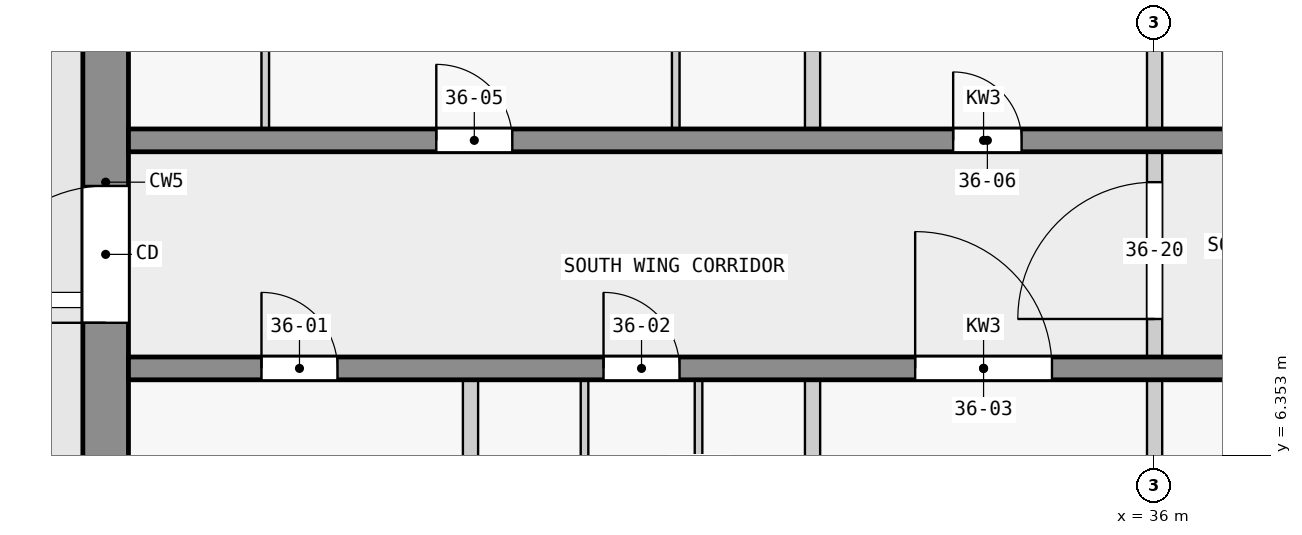
"""IFC4 building model, lengths in metres.
Left out: names, types, materials, properties, quantities, classifications, styles, units other than length and angle.
Written with IfcOpenShell. Run it as: python <this file> out.ifc"""

import sys

from ifc_helpers import new_model, si_unit, direction, frame, frame_2d, origin, place, context, subcontext, project, spatial, rectangle, extrude, element, fill, save


model = new_model("IFC4")
c1 = context("Model", 3, precision=1e-05, world=origin(), true_north=direction((0.0, 1.0)))
c2 = subcontext(c1, "Body", "Model", "MODEL_VIEW")
j1 = project(units=[si_unit("LENGTHUNIT", "METRE"), si_unit("PLANEANGLEUNIT", "RADIAN")], contexts=[c1])
p1 = place(None, origin())
s1 = spatial("IfcSite", under=j1, at=p1, CompositionType="ELEMENT")
p2 = place(p1, origin())
s2 = spatial("IfcBuilding", under=s1, at=p2, CompositionType="ELEMENT")
p3 = place(p2, frame((0.0, 0.0, 142.9)))
s3 = spatial("IfcBuildingStorey", under=s2, at=p3, CompositionType="ELEMENT", Elevation=142.9)
p4 = place(p3, frame((22.2, 2.5, 0.0), z_axis=(0.0, 0.0, 1.0), x_axis=(0.0, 1.0, 0.0)))
e1 = element("IfcWall", 1, at=p4, inside=s3, PredefinedType="SHEAR", context=c2, shape_type="SweptSolid", body=[
    extrude(rectangle(XDim=14.9, YDim=0.6, at=frame_2d((7.45, 0.0))), origin(), (0.0, 0.0, 1.0), 3.25),
])
p5 = place(p4, frame((5.6, 0.0, 0.0)))
e2 = element("IfcOpeningElement", 2, at=p5, cuts=e1, PredefinedType="OPENING", context=c2, shape_type="SweptSolid", body=[
    extrude(rectangle(XDim=1.8, YDim=2.1, at=frame_2d((0.9, 1.05))), frame((0.0, 0.31, 0.0), z_axis=(0.0, -1.0, 0.0), x_axis=(1.0, 0.0, 0.0)), (0.0, 0.0, 1.0), 0.62),
])
p6 = place(p3, frame((22.5, 7.5, 0.0), z_axis=(0.0, 0.0, 1.0), x_axis=(1.0, 0.0, 0.0)))
e3 = element("IfcWall", 3, at=p6, inside=s3, PredefinedType="SHEAR", context=c2, shape_type="SweptSolid", body=[
    extrude(rectangle(XDim=22.5, YDim=0.3, at=frame_2d((11.25, 0.0))), origin(), (0.0, 0.0, 1.0), 3.25),
])
p7 = place(p6, frame((1.75, 0.0, 0.0)))
e4 = element("IfcOpeningElement", 4, at=p7, cuts=e3, PredefinedType="OPENING", context=c2, shape_type="SweptSolid", body=[
    extrude(rectangle(XDim=1.0, YDim=2.1, at=frame_2d((0.5, 1.05))), frame((0.0, 0.16, 0.0), z_axis=(0.0, -1.0, 0.0), x_axis=(1.0, 0.0, 0.0)), (0.0, 0.0, 1.0), 0.32),
])
p8 = place(p6, frame((6.25, 0.0, 0.0)))
e5 = element("IfcOpeningElement", 5, at=p8, cuts=e3, PredefinedType="OPENING", context=c2, shape_type="SweptSolid", body=[
    extrude(rectangle(XDim=1.0, YDim=2.1, at=frame_2d((0.5, 1.05))), frame((0.0, 0.16, 0.0), z_axis=(0.0, -1.0, 0.0), x_axis=(1.0, 0.0, 0.0)), (0.0, 0.0, 1.0), 0.32),
])
p9 = place(p6, frame((10.35, 0.0, 0.0)))
e6 = element("IfcOpeningElement", 6, at=p9, cuts=e3, PredefinedType="OPENING", context=c2, shape_type="SweptSolid", body=[
    extrude(rectangle(XDim=1.8, YDim=2.1, at=frame_2d((0.9, 1.05))), frame((0.0, 0.16, 0.0), z_axis=(0.0, -1.0, 0.0), x_axis=(1.0, 0.0, 0.0)), (0.0, 0.0, 1.0), 0.32),
])
p10 = place(p6, frame((16.85, 0.0, 0.0)))
e7 = element("IfcOpeningElement", 7, at=p10, cuts=e3, PredefinedType="OPENING", context=c2, shape_type="SweptSolid", body=[
    extrude(rectangle(XDim=1.0, YDim=2.1, at=frame_2d((0.5, 1.05))), frame((0.0, 0.16, 0.0), z_axis=(0.0, -1.0, 0.0), x_axis=(1.0, 0.0, 0.0)), (0.0, 0.0, 1.0), 0.32),
])
p11 = place(p3, frame((22.5, 10.5, 0.0), z_axis=(0.0, 0.0, 1.0), x_axis=(1.0, 0.0, 0.0)))
e8 = element("IfcWall", 8, at=p11, inside=s3, PredefinedType="SHEAR", context=c2, shape_type="SweptSolid", body=[
    extrude(rectangle(XDim=22.5, YDim=0.3, at=frame_2d((11.25, 0.0))), origin(), (0.0, 0.0, 1.0), 3.25),
])
p12 = place(p11, frame((4.05, 0.0, 0.0)))
e9 = element("IfcOpeningElement", 9, at=p12, cuts=e8, PredefinedType="OPENING", context=c2, shape_type="SweptSolid", body=[
    extrude(rectangle(XDim=1.0, YDim=2.1, at=frame_2d((0.5, 1.05))), frame((0.0, 0.16, 0.0), z_axis=(0.0, -1.0, 0.0), x_axis=(1.0, 0.0, 0.0)), (0.0, 0.0, 1.0), 0.32),
])
p13 = place(p11, frame((10.85, 0.0, 0.0)))
e10 = element("IfcOpeningElement", 10, at=p13, cuts=e8, PredefinedType="OPENING", context=c2, shape_type="SweptSolid", body=[
    extrude(rectangle(XDim=0.9, YDim=2.1, at=frame_2d((0.45, 1.05))), frame((0.0, 0.16, 0.0), z_axis=(0.0, -1.0, 0.0), x_axis=(1.0, 0.0, 0.0)), (0.0, 0.0, 1.0), 0.32),
])
p14 = place(p11, frame((15.25, 0.0, 0.0)))
e11 = element("IfcOpeningElement", 11, at=p14, cuts=e8, PredefinedType="OPENING", context=c2, shape_type="SweptSolid", body=[
    extrude(rectangle(XDim=1.0, YDim=2.1, at=frame_2d((0.5, 1.05))), frame((0.0, 0.16, 0.0), z_axis=(0.0, -1.0, 0.0), x_axis=(1.0, 0.0, 0.0)), (0.0, 0.0, 1.0), 0.32),
])
p15 = place(p11, frame((18.75, 0.0, 0.0)))
e12 = element("IfcOpeningElement", 12, at=p15, cuts=e8, PredefinedType="OPENING", context=c2, shape_type="SweptSolid", body=[
    extrude(rectangle(XDim=0.9, YDim=2.1, at=frame_2d((0.45, 1.05))), frame((0.0, 0.16, 0.0), z_axis=(0.0, -1.0, 0.0), x_axis=(1.0, 0.0, 0.0)), (0.0, 0.0, 1.0), 0.32),
])
p16 = place(p11, frame((20.95, 0.0, 0.0)))
e13 = element("IfcOpeningElement", 13, at=p16, cuts=e8, PredefinedType="OPENING", context=c2, shape_type="SweptSolid", body=[
    extrude(rectangle(XDim=1.0, YDim=2.1, at=frame_2d((0.5, 1.05))), frame((0.0, 0.16, 0.0), z_axis=(0.0, -1.0, 0.0), x_axis=(1.0, 0.0, 0.0)), (0.0, 0.0, 1.0), 0.32),
])
p17 = place(p3, frame((24.3, 10.65, 0.0), z_axis=(0.0, 0.0, 1.0), x_axis=(0.0, 1.0, 0.0)))
e14 = element("IfcWall", 14, at=p17, inside=s3, PredefinedType="PARTITIONING", context=c2, shape_type="SweptSolid", body=[
    extrude(rectangle(XDim=3.4, YDim=0.1, at=frame_2d((1.7, 0.0))), origin(), (0.0, 0.0, 1.0), 3.25),
])
p18 = place(p17, frame((1.25, 0.0, 0.0)))
e15 = element("IfcOpeningElement", 15, at=p18, cuts=e14, PredefinedType="OPENING", context=c2, shape_type="SweptSolid", body=[
    extrude(rectangle(XDim=0.9, YDim=2.1, at=frame_2d((0.45, 1.05))), frame((0.0, 0.06, 0.0), z_axis=(0.0, -1.0, 0.0), x_axis=(1.0, 0.0, 0.0)), (0.0, 0.0, 1.0), 0.12),
])
p19 = place(p3, frame((27.0, 1.527, 0.0), z_axis=(0.0, 0.0, 1.0), x_axis=(0.0, 1.0, 0.0)))
e16 = element("IfcWall", 16, at=p19, inside=s3, PredefinedType="PARTITIONING", context=c2, shape_type="SweptSolid", body=[
    extrude(rectangle(XDim=5.823, YDim=0.2, at=frame_2d((2.912, 0.0))), origin(), (0.0, 0.0, 1.0), 3.25),
])
p20 = place(p3, frame((28.5, 3.95, 0.0), z_axis=(0.0, 0.0, 1.0), x_axis=(0.0, 1.0, 0.0)))
e17 = element("IfcWall", 17, at=p20, inside=s3, PredefinedType="PARTITIONING", context=c2, shape_type="SweptSolid", body=[
    extrude(rectangle(XDim=3.4, YDim=0.1, at=frame_2d((1.7, 0.0))), origin(), (0.0, 0.0, 1.0), 3.25),
])
p21 = place(p20, frame((1.25, 0.0, 0.0)))
e18 = element("IfcOpeningElement", 18, at=p21, cuts=e17, PredefinedType="OPENING", context=c2, shape_type="SweptSolid", body=[
    extrude(rectangle(XDim=0.9, YDim=2.1, at=frame_2d((0.45, 1.05))), frame((0.0, 0.06, 0.0), z_axis=(0.0, -1.0, 0.0), x_axis=(1.0, 0.0, 0.0)), (0.0, 0.0, 1.0), 0.12),
])
p22 = place(p3, frame((29.7, 14.05, 0.0), z_axis=(0.0, 0.0, 1.0), x_axis=(0.0, -1.0, 0.0)))
e19 = element("IfcWall", 19, at=p22, inside=s3, PredefinedType="PARTITIONING", context=c2, shape_type="SweptSolid", body=[
    extrude(rectangle(XDim=3.4, YDim=0.1, at=frame_2d((1.7, 0.0))), origin(), (0.0, 0.0, 1.0), 3.25),
])
p23 = place(p22, frame((1.25, 0.0, 0.0)))
e20 = element("IfcOpeningElement", 20, at=p23, cuts=e19, PredefinedType="OPENING", context=c2, shape_type="SweptSolid", body=[
    extrude(rectangle(XDim=0.9, YDim=2.1, at=frame_2d((0.45, 1.05))), frame((0.0, 0.06, 0.0), z_axis=(0.0, -1.0, 0.0), x_axis=(1.0, 0.0, 0.0)), (0.0, 0.0, 1.0), 0.12),
])
p24 = place(p3, frame((30.0, 7.35, 0.0), z_axis=(0.0, 0.0, 1.0), x_axis=(0.0, -1.0, 0.0)))
e21 = element("IfcWall", 21, at=p24, inside=s3, PredefinedType="PARTITIONING", context=c2, shape_type="SweptSolid", body=[
    extrude(rectangle(XDim=3.4, YDim=0.1, at=frame_2d((1.7, 0.0))), origin(), (0.0, 0.0, 1.0), 3.25),
])
p25 = place(p24, frame((1.25, 0.0, 0.0)))
e22 = element("IfcOpeningElement", 22, at=p25, cuts=e21, PredefinedType="OPENING", context=c2, shape_type="SweptSolid", body=[
    extrude(rectangle(XDim=0.9, YDim=2.1, at=frame_2d((0.45, 1.05))), frame((0.0, 0.06, 0.0), z_axis=(0.0, -1.0, 0.0), x_axis=(1.0, 0.0, 0.0)), (0.0, 0.0, 1.0), 0.12),
])
for number, where, z_axis, x_axis in (
    (23, (31.5, 3.95, 0.0), (0.0, 0.0, 1.0), (0.0, 1.0, 0.0)),
    (24, (31.5, 10.65, 0.0), (0.0, 0.0, 1.0), (0.0, 1.0, 0.0)),
):
    element("IfcWall", number, at=place(p3, frame(where, z_axis=z_axis, x_axis=x_axis)), inside=s3, PredefinedType="PARTITIONING", context=c2, shape_type="SweptSolid", body=[
        extrude(rectangle(XDim=3.4, YDim=0.2, at=frame_2d((1.7, 0.0))), origin(), (0.0, 0.0, 1.0), 3.25),
    ])
for number, where, z_axis, x_axis in (
    (25, (36.0, 1.4, 0.0), (0.0, 0.0, 1.0), (0.0, 1.0, 0.0)),
    (26, (36.0, 10.65, 0.0), (0.0, 0.0, 1.0), (0.0, 1.0, 0.0)),
):
    element("IfcWall", number, at=place(p3, frame(where, z_axis=z_axis, x_axis=x_axis)), inside=s3, PredefinedType="PARTITIONING", context=c2, shape_type="SweptSolid", body=[
        extrude(rectangle(XDim=5.95, YDim=0.2, at=frame_2d((2.975, 0.0))), origin(), (0.0, 0.0, 1.0), 3.25),
    ])
p26 = place(p3, frame((36.0, 7.45, 0.0), z_axis=(0.0, 0.0, 1.0), x_axis=(0.0, 1.0, 0.0)))
e27 = element("IfcWall", 27, at=p26, inside=s3, PredefinedType="PARTITIONING", context=c2, shape_type="SweptSolid", body=[
    extrude(rectangle(XDim=3.1, YDim=0.2, at=frame_2d((1.55, 0.0))), origin(), (0.0, 0.0, 1.0), 3.25),
])
p27 = place(p26, frame((0.7, 0.0, 0.0)))
e28 = element("IfcOpeningElement", 28, at=p27, cuts=e27, PredefinedType="OPENING", context=c2, shape_type="SweptSolid", body=[
    extrude(rectangle(XDim=1.8, YDim=2.1, at=frame_2d((0.9, 1.05))), frame((0.0, 0.11, 0.0), z_axis=(0.0, -1.0, 0.0), x_axis=(1.0, 0.0, 0.0)), (0.0, 0.0, 1.0), 0.22),
])
p28 = place(p5, origin())
e29 = element("IfcDoor", 29, at=p28, inside=s3, OperationType="DOUBLE_DOOR_SINGLE_SWING", PredefinedType="DOOR", context=c2, shape_type="SweptSolid", body=[
    extrude(rectangle(XDim=1.8, YDim=2.1, at=frame_2d((0.9, 1.05))), frame((0.0, 0.025, 0.0), z_axis=(0.0, -1.0, 0.0), x_axis=(1.0, 0.0, 0.0)), (0.0, 0.0, 1.0), 0.05),
])
fill(e2, e29)
p29 = place(p7, origin())
e30 = element("IfcDoor", 30, at=p29, inside=s3, OperationType="SINGLE_SWING_LEFT", PredefinedType="DOOR", context=c2, shape_type="SweptSolid", body=[
    extrude(rectangle(XDim=1.0, YDim=2.1, at=frame_2d((0.5, 1.05))), frame((0.0, 0.025, 0.0), z_axis=(0.0, -1.0, 0.0), x_axis=(1.0, 0.0, 0.0)), (0.0, 0.0, 1.0), 0.05),
])
fill(e4, e30)
p30 = place(p8, origin())
e31 = element("IfcDoor", 31, at=p30, inside=s3, OperationType="SINGLE_SWING_LEFT", PredefinedType="DOOR", context=c2, shape_type="SweptSolid", body=[
    extrude(rectangle(XDim=1.0, YDim=2.1, at=frame_2d((0.5, 1.05))), frame((0.0, 0.025, 0.0), z_axis=(0.0, -1.0, 0.0), x_axis=(1.0, 0.0, 0.0)), (0.0, 0.0, 1.0), 0.05),
])
fill(e5, e31)
p31 = place(p9, origin())
e32 = element("IfcDoor", 32, at=p31, inside=s3, OperationType="SINGLE_SWING_LEFT", PredefinedType="DOOR", context=c2, shape_type="SweptSolid", body=[
    extrude(rectangle(XDim=1.8, YDim=2.1, at=frame_2d((0.9, 1.05))), frame((0.0, 0.025, 0.0), z_axis=(0.0, -1.0, 0.0), x_axis=(1.0, 0.0, 0.0)), (0.0, 0.0, 1.0), 0.05),
])
fill(e6, e32)
p32 = place(p12, origin())
e33 = element("IfcDoor", 33, at=p32, inside=s3, OperationType="SINGLE_SWING_LEFT", PredefinedType="DOOR", context=c2, shape_type="SweptSolid", body=[
    extrude(rectangle(XDim=1.0, YDim=2.1, at=frame_2d((0.5, 1.05))), frame((0.0, 0.025, 0.0), z_axis=(0.0, -1.0, 0.0), x_axis=(1.0, 0.0, 0.0)), (0.0, 0.0, 1.0), 0.05),
])
fill(e9, e33)
p33 = place(p13, origin())
e34 = element("IfcDoor", 34, at=p33, inside=s3, OperationType="SINGLE_SWING_RIGHT", PredefinedType="DOOR", context=c2, shape_type="SweptSolid", body=[
    extrude(rectangle(XDim=0.9, YDim=2.1, at=frame_2d((0.45, 1.05))), frame((0.0, 0.025, 0.0), z_axis=(0.0, -1.0, 0.0), x_axis=(1.0, 0.0, 0.0)), (0.0, 0.0, 1.0), 0.05),
])
fill(e10, e34)
p34 = place(p27, origin())
e35 = element("IfcDoor", 35, at=p34, inside=s3, OperationType="SINGLE_SWING_RIGHT", PredefinedType="DOOR", context=c2, shape_type="SweptSolid", body=[
    extrude(rectangle(XDim=1.8, YDim=2.1, at=frame_2d((0.9, 1.05))), frame((0.0, 0.025, 0.0), z_axis=(0.0, -1.0, 0.0), x_axis=(1.0, 0.0, 0.0)), (0.0, 0.0, 1.0), 0.05),
])
fill(e28, e35)
save(model, sys.argv[1])
